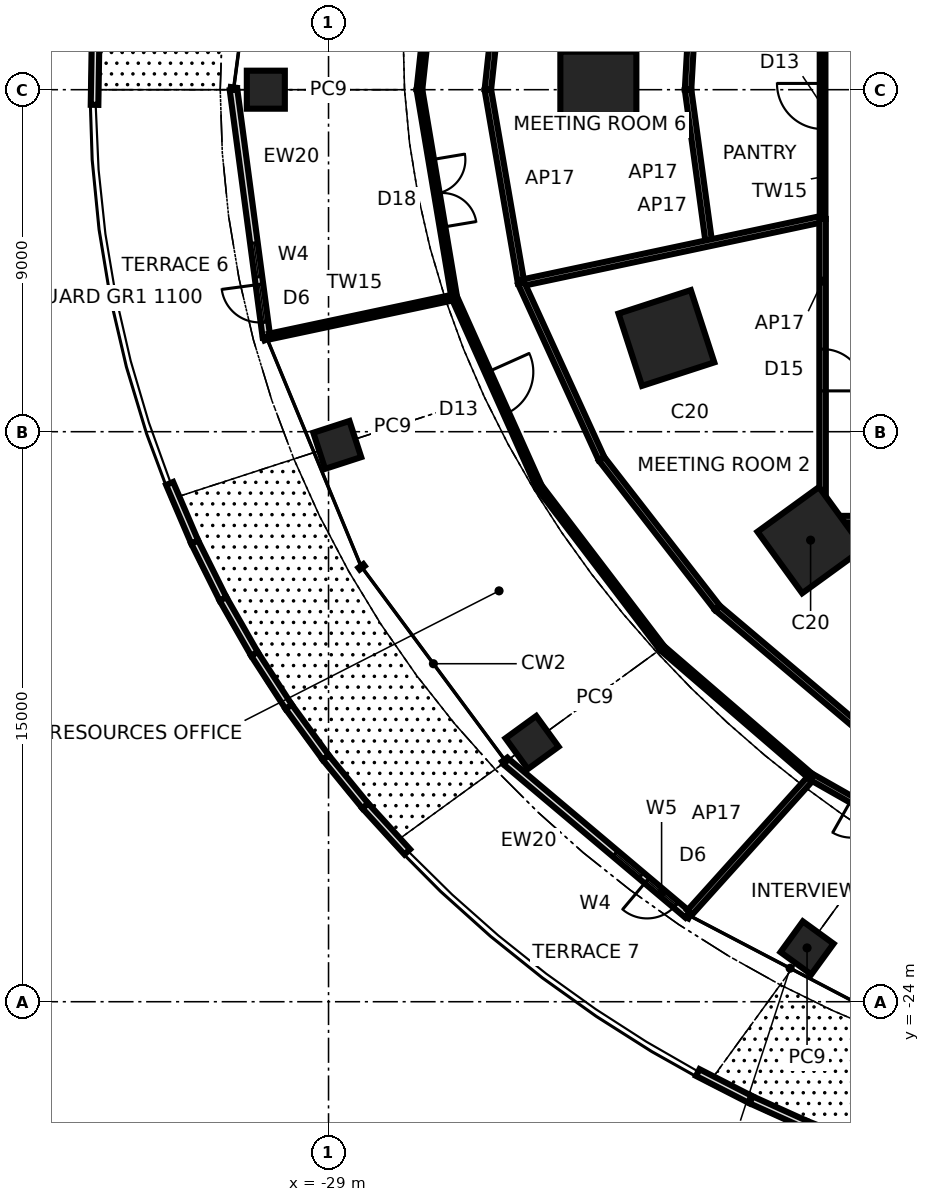
"""IFC4 building model, lengths in metres.
Left out: names, types, materials, properties, quantities, classifications, styles, units other than length and angle.
Written with IfcOpenShell. Run it as: python <this file> out.ifc"""

import sys

from ifc_helpers import new_model, si_unit, direction, frame, frame_2d, origin, origin_2d, place, context, subcontext, project, spatial, rectangle, extrude, element, fill, save


model = new_model("IFC4")
c1 = context("Model", 3, precision=1e-05, world=origin(), true_north=direction((0.0, 1.0)))
c2 = subcontext(c1, "Body", "Model", "MODEL_VIEW")
j1 = project(units=[si_unit("LENGTHUNIT", "METRE"), si_unit("PLANEANGLEUNIT", "RADIAN")], contexts=[c1])
p1 = place(None, origin())
s1 = spatial("IfcSite", under=j1, at=p1, CompositionType="ELEMENT")
p2 = place(p1, origin())
s2 = spatial("IfcBuilding", under=s1, at=p2, CompositionType="ELEMENT")
p3 = place(p2, frame((0.0, 0.0, 15.1)))
s3 = spatial("IfcBuildingStorey", under=s2, at=p3, CompositionType="ELEMENT", Elevation=15.1)
for number, where, z_axis, x_axis in (
    (1, (-21.9, 0.0, 0.0), (0.0, 0.0, 1.0), (-1.0, 0.0, 0.0)),
    (2, (-20.109, -6.534, 0.0), (0.0, 0.0, 1.0), (-0.951, -0.309, 0.0)),
    (3, (-16.315, -11.854, 0.0), (0.0, 0.0, 1.0), (-0.809, -0.588, 0.0)),
):
    element("IfcColumn", number, at=place(p3, frame(where, z_axis=z_axis, x_axis=x_axis)), inside=s3, PredefinedType="COLUMN", context=c2, shape_type="SweptSolid", body=[
        extrude(rectangle(XDim=2.0, YDim=2.0, at=origin_2d()), origin(), (0.0, 0.0, 1.0), 4.5),
    ])
for number, where, z_axis, x_axis in (
    (4, (-30.65, 0.0, 0.0), (0.0, 0.0, 1.0), (-1.0, 0.0, 0.0)),
    (5, (-28.77, -9.348, 0.0), (0.0, 0.0, 1.0), (-0.951, -0.309, 0.0)),
    (6, (-23.645, -17.179, 0.0), (0.0, 0.0, 1.0), (-0.809, -0.588, 0.0)),
    (7, (-16.409, -22.584, 0.0), (0.0, 0.0, 1.0), (-0.588, -0.809, 0.0)),
):
    element("IfcColumn", number, at=place(p3, frame(where, z_axis=z_axis, x_axis=x_axis)), inside=s3, PredefinedType="COLUMN", context=c2, shape_type="SweptSolid", body=[
        extrude(rectangle(XDim=1.0, YDim=1.0, at=origin_2d()), origin(), (0.0, 0.0, 1.0), 4.5),
    ])
p4 = place(p3, frame((-31.5, 0.0, 0.0), z_axis=(0.0, 0.0, 1.0), x_axis=(0.131830186359, -0.991272314737, 0.0)))
e8 = element("IfcWall", 8, at=p4, inside=s3, PredefinedType="SOLIDWALL", context=c2, shape_type="SweptSolid", body=[
    extrude(rectangle(XDim=6.569, YDim=0.2, at=frame_2d((3.284, 0.0))), origin(), (0.0, 0.0, 1.0), 4.3),
])
p5 = place(p4, frame((5.169, 0.0, 0.0)))
e9 = element("IfcOpeningElement", 9, at=p5, cuts=e8, PredefinedType="OPENING", context=c2, shape_type="SweptSolid", body=[
    extrude(rectangle(XDim=1.0, YDim=2.4, at=frame_2d((0.5, 1.2))), frame((0.0, 0.11, 0.0), z_axis=(0.0, -1.0, 0.0), x_axis=(1.0, 0.0, 0.0)), (0.0, 0.0, 1.0), 0.22),
])
p6 = place(p4, frame((4.069, 0.0, 0.3)))
e10 = element("IfcOpeningElement", 10, at=p6, cuts=e8, PredefinedType="OPENING", context=c2, shape_type="SweptSolid", body=[
    extrude(rectangle(XDim=0.9, YDim=2.1, at=frame_2d((0.45, 1.05))), frame((0.0, 0.11, 0.0), z_axis=(0.0, -1.0, 0.0), x_axis=(1.0, 0.0, 0.0)), (0.0, 0.0, 1.0), 0.22),
])
p7 = place(p4, frame((5.169, 0.0, 2.7)))
e11 = element("IfcOpeningElement", 11, at=p7, cuts=e8, PredefinedType="OPENING", context=c2, shape_type="SweptSolid", body=[
    extrude(rectangle(XDim=1.0, YDim=0.6, at=frame_2d((0.5, 0.3))), frame((0.0, 0.11, 0.0), z_axis=(0.0, -1.0, 0.0), x_axis=(1.0, 0.0, 0.0)), (0.0, 0.0, 1.0), 0.22),
])
p8 = place(p3, frame((-24.332, -17.678, 0.0), z_axis=(0.0, 0.0, 1.0), x_axis=(0.764694610458, -0.644392855901, 0.0)))
e12 = element("IfcWall", 12, at=p8, inside=s3, PredefinedType="SOLIDWALL", context=c2, shape_type="SweptSolid", body=[
    extrude(rectangle(XDim=6.257, YDim=0.2, at=frame_2d((3.128, 0.0))), origin(), (0.0, 0.0, 1.0), 4.3),
])
p9 = place(p8, frame((4.857, 0.0, 0.0)))
e13 = element("IfcOpeningElement", 13, at=p9, cuts=e12, PredefinedType="OPENING", context=c2, shape_type="SweptSolid", body=[
    extrude(rectangle(XDim=1.0, YDim=2.4, at=frame_2d((0.5, 1.2))), frame((0.0, 0.11, 0.0), z_axis=(0.0, -1.0, 0.0), x_axis=(1.0, 0.0, 0.0)), (0.0, 0.0, 1.0), 0.22),
])
p10 = place(p8, frame((3.757, 0.0, 0.3)))
e14 = element("IfcOpeningElement", 14, at=p10, cuts=e12, PredefinedType="OPENING", context=c2, shape_type="SweptSolid", body=[
    extrude(rectangle(XDim=0.9, YDim=2.1, at=frame_2d((0.45, 1.05))), frame((0.0, 0.11, 0.0), z_axis=(0.0, -1.0, 0.0), x_axis=(1.0, 0.0, 0.0)), (0.0, 0.0, 1.0), 0.22),
])
p11 = place(p8, frame((4.857, 0.0, 2.7)))
e15 = element("IfcOpeningElement", 15, at=p11, cuts=e12, PredefinedType="OPENING", context=c2, shape_type="SweptSolid", body=[
    extrude(rectangle(XDim=1.0, YDim=0.6, at=frame_2d((0.5, 0.3))), frame((0.0, 0.11, 0.0), z_axis=(0.0, -1.0, 0.0), x_axis=(1.0, 0.0, 0.0)), (0.0, 0.0, 1.0), 0.22),
])
p12 = place(p3, frame((-35.13, 1.293, 0.0), z_axis=(0.0, 0.0, 1.0), x_axis=(-0.016012951677, -0.99987178447, 0.0)))
e16 = element("IfcWall", 16, at=p12, inside=s3, PredefinedType="PARAPET", context=c2, shape_type="SweptSolid", body=[
    extrude(rectangle(XDim=1.692, YDim=0.2, at=frame_2d((0.846, 0.0))), origin(), (0.0, 0.0, 1.0), 1.1),
])
p13 = place(p3, frame((-33.181, -10.362, 0.0), z_axis=(0.0, 0.0, 1.0), x_axis=(0.393462645444, -0.919340604259, 0.0)))
e17 = element("IfcWall", 17, at=p13, inside=s3, PredefinedType="PARAPET", context=c2, shape_type="SweptSolid", body=[
    extrude(rectangle(XDim=1.678, YDim=0.2, at=frame_2d((0.839, 0.0))), origin(), (0.0, 0.0, 1.0), 1.1),
])
p14 = place(p3, frame((-32.521, -11.904, 0.0), z_axis=(0.0, 0.0, 1.0), x_axis=(0.445752950689, -0.895156023804, 0.0)))
e18 = element("IfcWall", 18, at=p14, inside=s3, PredefinedType="PARAPET", context=c2, shape_type="SweptSolid", body=[
    extrude(rectangle(XDim=1.672, YDim=0.2, at=frame_2d((0.836, 0.0))), origin(), (0.0, 0.0, 1.0), 1.1),
])
p15 = place(p3, frame((-31.776, -13.401, 0.0), z_axis=(0.0, 0.0, 1.0), x_axis=(0.495933811562, -0.868360325297, 0.0)))
e19 = element("IfcWall", 19, at=p15, inside=s3, PredefinedType="PARAPET", context=c2, shape_type="SweptSolid", body=[
    extrude(rectangle(XDim=1.667, YDim=0.2, at=frame_2d((0.833, 0.0))), origin(), (0.0, 0.0, 1.0), 1.1),
])
p16 = place(p3, frame((-30.949, -14.848, 0.0), z_axis=(0.0, 0.0, 1.0), x_axis=(0.543995202045, -0.839088326788, 0.0)))
e20 = element("IfcWall", 20, at=p16, inside=s3, PredefinedType="PARAPET", context=c2, shape_type="SweptSolid", body=[
    extrude(rectangle(XDim=1.66, YDim=0.2, at=frame_2d((0.83, 0.0))), origin(), (0.0, 0.0, 1.0), 1.1),
])
p17 = place(p3, frame((-30.047, -16.241, 0.0), z_axis=(0.0, 0.0, 1.0), x_axis=(0.589594151597, -0.8076996573, 0.0)))
e21 = element("IfcWall", 21, at=p17, inside=s3, PredefinedType="PARAPET", context=c2, shape_type="SweptSolid", body=[
    extrude(rectangle(XDim=1.652, YDim=0.2, at=frame_2d((0.826, 0.0))), origin(), (0.0, 0.0, 1.0), 1.1),
])
p18 = place(p3, frame((-29.073, -17.575, 0.0), z_axis=(0.0, 0.0, 1.0), x_axis=(0.632987157267, -0.774162294829, 0.0)))
e22 = element("IfcWall", 22, at=p18, inside=s3, PredefinedType="PARAPET", context=c2, shape_type="SweptSolid", body=[
    extrude(rectangle(XDim=1.645, YDim=0.2, at=frame_2d((0.822, 0.0))), origin(), (0.0, 0.0, 1.0), 1.1),
])
p19 = place(p3, frame((-28.031, -18.848, 0.0), z_axis=(0.0, 0.0, 1.0), x_axis=(0.673823364238, -0.738892464306, 0.0)))
e23 = element("IfcWall", 23, at=p19, inside=s3, PredefinedType="PARAPET", context=c2, shape_type="SweptSolid", body=[
    extrude(rectangle(XDim=1.636, YDim=0.2, at=frame_2d((0.818, 0.0))), origin(), (0.0, 0.0, 1.0), 1.1),
])
p20 = place(p3, frame((-19.285, -25.864, 0.0), z_axis=(0.0, 0.0, 1.0), x_axis=(0.890360687019, -0.45525580393, 0.0)))
e24 = element("IfcWall", 24, at=p20, inside=s3, PredefinedType="PARAPET", context=c2, shape_type="SweptSolid", body=[
    extrude(rectangle(XDim=1.575, YDim=0.2, at=frame_2d((0.788, 0.0))), origin(), (0.0, 0.0, 1.0), 1.1),
])
p21 = place(p3, frame((-17.882, -26.581, 0.0), z_axis=(0.0, 0.0, 1.0), x_axis=(0.911368711004, -0.411590904422, 0.0)))
e25 = element("IfcWall", 25, at=p21, inside=s3, PredefinedType="PARAPET", context=c2, shape_type="SweptSolid", body=[
    extrude(rectangle(XDim=1.564, YDim=0.2, at=frame_2d((0.782, 0.0))), origin(), (0.0, 0.0, 1.0), 1.1),
])
p22 = place(p3, frame((-16.457, -27.225, 0.0), z_axis=(0.0, 0.0, 1.0), x_axis=(0.929825664331, -0.368000317869, 0.0)))
e26 = element("IfcWall", 26, at=p22, inside=s3, PredefinedType="PARAPET", context=c2, shape_type="SweptSolid", body=[
    extrude(rectangle(XDim=1.553, YDim=0.2, at=frame_2d((0.776, 0.0))), origin(), (0.0, 0.0, 1.0), 1.1),
])
p23 = place(p3, frame((-16.0, 2.481, 0.0), z_axis=(0.0, 0.0, 1.0), x_axis=(0.0, -1.0, 0.0)))
e27 = element("IfcWall", 27, at=p23, inside=s3, PredefinedType="PARTITIONING", context=c2, shape_type="SweptSolid", body=[
    extrude(rectangle(XDim=5.882, YDim=0.15, at=frame_2d((2.941, 0.0))), origin(), (0.0, 0.0, 1.0), 4.3),
])
p24 = place(p23, frame((2.316, 0.0, 0.0)))
e28 = element("IfcOpeningElement", 28, at=p24, cuts=e27, PredefinedType="OPENING", context=c2, shape_type="SweptSolid", body=[
    extrude(rectangle(XDim=1.2, YDim=2.4, at=frame_2d((0.6, 1.2))), frame((0.0, 0.085, 0.0), z_axis=(0.0, -1.0, 0.0), x_axis=(1.0, 0.0, 0.0)), (0.0, 0.0, 1.0), 0.17),
])
p25 = place(p3, frame((-23.932, -5.087, 0.0), z_axis=(0.0, 0.0, 1.0), x_axis=(-0.169704177239, 0.985495049317, 0.0)))
e29 = element("IfcWall", 29, at=p25, inside=s3, PredefinedType="PARTITIONING", context=c2, shape_type="SweptSolid", body=[
    extrude(rectangle(XDim=5.162, YDim=0.17, at=frame_2d((2.581, 0.0))), origin(), (0.0, 0.0, 1.0), 4.3),
])
p26 = place(p3, frame((-26.608, 0.0, 0.0), z_axis=(0.0, 0.0, 1.0), x_axis=(0.165292631836, -0.986244566961, 0.0)))
e30 = element("IfcWall", 30, at=p26, inside=s3, PredefinedType="PARTITIONING", context=c2, shape_type="SweptSolid", body=[
    extrude(rectangle(XDim=5.537, YDim=0.15, at=frame_2d((2.769, 0.0))), origin(), (0.0, 0.0, 1.0), 4.3),
])
p27 = place(p26, frame((1.869, 0.0, 0.0)))
e31 = element("IfcOpeningElement", 31, at=p27, cuts=e30, PredefinedType="OPENING", context=c2, shape_type="SweptSolid", body=[
    extrude(rectangle(XDim=1.8, YDim=2.4, at=frame_2d((0.9, 1.2))), frame((0.0, 0.085, 0.0), z_axis=(0.0, -1.0, 0.0), x_axis=(1.0, 0.0, 0.0)), (0.0, 0.0, 1.0), 0.17),
])
p28 = place(p3, frame((-18.99, -4.036, 0.0), z_axis=(0.0, 0.0, 1.0), x_axis=(-0.135024948545, 0.990842198975, 0.0)))
e32 = element("IfcWall", 32, at=p28, inside=s3, PredefinedType="PARTITIONING", context=c2, shape_type="SweptSolid", body=[
    extrude(rectangle(XDim=4.074, YDim=0.17, at=frame_2d((2.037, 0.0))), origin(), (0.0, 0.0, 1.0), 4.3),
])
p29 = place(p3, frame((-23.932, -5.087, 0.0), z_axis=(0.0, 0.0, 1.0), x_axis=(0.97814737229, 0.20791276556, 0.0)))
e33 = element("IfcWall", 33, at=p29, inside=s3, PredefinedType="PARTITIONING", context=c2, shape_type="SweptSolid", body=[
    extrude(rectangle(XDim=8.109, YDim=0.17, at=frame_2d((4.055, 0.0))), origin(), (0.0, 0.0, 1.0), 4.3),
])
p30 = place(p3, frame((-25.693, -5.461, 0.0), z_axis=(0.0, 0.0, 1.0), x_axis=(-0.978146743391, -0.207915724259, 0.0)))
e34 = element("IfcWall", 34, at=p30, inside=s3, PredefinedType="PARTITIONING", context=c2, shape_type="SweptSolid", body=[
    extrude(rectangle(XDim=4.972, YDim=0.15, at=frame_2d((2.486, 0.0))), origin(), (0.0, 0.0, 1.0), 4.3),
])
p31 = place(p3, frame((-21.816, -9.713, 0.0), z_axis=(0.0, 0.0, 1.0), x_axis=(-0.415942352912, 0.909390982501, 0.0)))
e35 = element("IfcWall", 35, at=p31, inside=s3, PredefinedType="PARTITIONING", context=c2, shape_type="SweptSolid", body=[
    extrude(rectangle(XDim=5.087, YDim=0.17, at=frame_2d((2.543, 0.0))), origin(), (0.0, 0.0, 1.0), 4.3),
])
p32 = place(p3, frame((-25.693, -5.461, 0.0), z_axis=(0.0, 0.0, 1.0), x_axis=(0.408737544403, -0.912651970795, 0.0)))
e36 = element("IfcWall", 36, at=p32, inside=s3, PredefinedType="PARTITIONING", context=c2, shape_type="SweptSolid", body=[
    extrude(rectangle(XDim=5.461, YDim=0.15, at=frame_2d((2.73, 0.0))), origin(), (0.0, 0.0, 1.0), 4.3),
])
p33 = place(p32, frame((2.156, 0.0, 0.0)))
e37 = element("IfcOpeningElement", 37, at=p33, cuts=e36, PredefinedType="OPENING", context=c2, shape_type="SweptSolid", body=[
    extrude(rectangle(XDim=1.2, YDim=2.4, at=frame_2d((0.6, 1.2))), frame((0.0, 0.085, 0.0), z_axis=(0.0, -1.0, 0.0), x_axis=(1.0, 0.0, 0.0)), (0.0, 0.0, 1.0), 0.17),
])
p34 = place(p3, frame((-16.0, -3.401, 0.0), z_axis=(0.0, 0.0, 1.0), x_axis=(0.0, -1.0, 0.0)))
e38 = element("IfcWall", 38, at=p34, inside=s3, PredefinedType="PARTITIONING", context=c2, shape_type="SweptSolid", body=[
    extrude(rectangle(XDim=7.899, YDim=0.17, at=frame_2d((3.95, 0.0))), origin(), (0.0, 0.0, 1.0), 4.3),
])
p35 = place(p34, frame((3.425, 0.0, 0.0)))
e39 = element("IfcOpeningElement", 39, at=p35, cuts=e38, PredefinedType="OPENING", context=c2, shape_type="SweptSolid", body=[
    extrude(rectangle(XDim=1.1, YDim=2.4, at=frame_2d((0.55, 1.2))), frame((0.0, 0.095, 0.0), z_axis=(0.0, -1.0, 0.0), x_axis=(1.0, 0.0, 0.0)), (0.0, 0.0, 1.0), 0.19),
])
p36 = place(p3, frame((-18.768, -13.636, 0.0), z_axis=(0.0, 0.0, 1.0), x_axis=(-0.613532245813, 0.789669667233, 0.0)))
e40 = element("IfcWall", 40, at=p36, inside=s3, PredefinedType="PARTITIONING", context=c2, shape_type="SweptSolid", body=[
    extrude(rectangle(XDim=4.968, YDim=0.17, at=frame_2d((2.484, 0.0))), origin(), (0.0, 0.0, 1.0), 4.3),
])
p37 = place(p3, frame((-23.46, -10.445, 0.0), z_axis=(0.0, 0.0, 1.0), x_axis=(0.605937156355, -0.795512515646, 0.0)))
e41 = element("IfcWall", 41, at=p37, inside=s3, PredefinedType="PARTITIONING", context=c2, shape_type="SweptSolid", body=[
    extrude(rectangle(XDim=5.341, YDim=0.15, at=frame_2d((2.67, 0.0))), origin(), (0.0, 0.0, 1.0), 4.3),
])
p38 = place(p3, frame((-15.082, -16.75, 0.0), z_axis=(0.0, 0.0, 1.0), x_axis=(-0.763840902497, 0.645404582935, 0.0)))
e42 = element("IfcWall", 42, at=p38, inside=s3, PredefinedType="PARTITIONING", context=c2, shape_type="SweptSolid", body=[
    extrude(rectangle(XDim=4.826, YDim=0.17, at=frame_2d((2.413, 0.0))), origin(), (0.0, 0.0, 1.0), 4.3),
])
p39 = place(p3, frame((-20.224, -14.694, 0.0), z_axis=(0.0, 0.0, 1.0), x_axis=(0.757397147913, -0.652954485652, 0.0)))
e43 = element("IfcWall", 43, at=p39, inside=s3, PredefinedType="PARTITIONING", context=c2, shape_type="SweptSolid", body=[
    extrude(rectangle(XDim=5.199, YDim=0.15, at=frame_2d((2.599, 0.0))), origin(), (0.0, 0.0, 1.0), 4.3),
])
p40 = place(p3, frame((-16.287, -18.088, 0.0), z_axis=(0.0, 0.0, 1.0), x_axis=(-0.669136360949, -0.74313964398, 0.0)))
e44 = element("IfcWall", 44, at=p40, inside=s3, PredefinedType="PARTITIONING", context=c2, shape_type="SweptSolid", body=[
    extrude(rectangle(XDim=4.793, YDim=0.17, at=frame_2d((2.397, 0.0))), origin(), (0.0, 0.0, 1.0), 4.3),
])
p41 = place(p3, frame((-16.287, -18.088, 0.0), z_axis=(0.0, 0.0, 1.0), x_axis=(0.869623219344, -0.493715967312, 0.0)))
e45 = element("IfcWall", 45, at=p41, inside=s3, PredefinedType="PARTITIONING", context=c2, shape_type="SweptSolid", body=[
    extrude(rectangle(XDim=5.061, YDim=0.17, at=frame_2d((2.53, 0.0))), origin(), (0.0, 0.0, 1.0), 4.3),
])
p42 = place(p41, frame((1.203, 0.0, 0.0)))
e46 = element("IfcOpeningElement", 46, at=p42, cuts=e45, PredefinedType="OPENING", context=c2, shape_type="SweptSolid", body=[
    extrude(rectangle(XDim=1.0, YDim=2.4, at=frame_2d((0.5, 1.2))), frame((0.0, 0.095, 0.0), z_axis=(0.0, -1.0, 0.0), x_axis=(1.0, 0.0, 0.0)), (0.0, 0.0, 1.0), 0.19),
])
p43 = place(p3, frame((-16.0, -11.3, 0.0), z_axis=(0.0, 0.0, 1.0), x_axis=(1.0, 0.0, 0.0)))
e47 = element("IfcWall", 47, at=p43, inside=s3, PredefinedType="PARTITIONING", context=c2, shape_type="SweptSolid", body=[
    extrude(rectangle(XDim=22.524, YDim=0.17, at=frame_2d((11.262, 0.0))), origin(), (0.0, 0.0, 1.0), 4.3),
])
p44 = place(p43, frame((18.118, 0.0, 0.0)))
e48 = element("IfcOpeningElement", 48, at=p44, cuts=e47, PredefinedType="OPENING", context=c2, shape_type="SweptSolid", body=[
    extrude(rectangle(XDim=1.1, YDim=2.4, at=frame_2d((0.55, 1.2))), frame((0.0, 0.095, 0.0), z_axis=(0.0, -1.0, 0.0), x_axis=(1.0, 0.0, 0.0)), (0.0, 0.0, 1.0), 0.19),
])
p45 = place(p43, frame((9.794, 0.0, 0.0)))
e49 = element("IfcOpeningElement", 49, at=p45, cuts=e47, PredefinedType="OPENING", context=c2, shape_type="SweptSolid", body=[
    extrude(rectangle(XDim=1.0, YDim=2.4, at=frame_2d((0.5, 1.2))), frame((0.0, 0.095, 0.0), z_axis=(0.0, -1.0, 0.0), x_axis=(1.0, 0.0, 0.0)), (0.0, 0.0, 1.0), 0.19),
])
p46 = place(p3, frame((-26.009, 5.528, 0.0), z_axis=(0.0, 0.0, 1.0), x_axis=(-0.107698829118, -0.994183565649, 0.0)))
e50 = element("IfcWall", 50, at=p46, inside=s3, PredefinedType="PARTITIONING", context=c2, shape_type="SweptSolid", body=[
    extrude(rectangle(XDim=5.561, YDim=0.15, at=frame_2d((2.78, 0.0))), origin(), (0.0, 0.0, 1.0), 4.3),
])
p47 = place(p3, frame((-24.808, 0.0, 0.0), z_axis=(0.0, 0.0, 1.0), x_axis=(0.107983193609, 0.994152719605, 0.0)))
e51 = element("IfcWall", 51, at=p47, inside=s3, PredefinedType="PARTITIONING", context=c2, shape_type="SweptSolid", body=[
    extrude(rectangle(XDim=4.28, YDim=0.17, at=frame_2d((2.14, 0.0))), origin(), (0.0, 0.0, 1.0), 4.3),
])
p48 = place(p3, frame((-19.54, 0.0, 0.0), z_axis=(0.0, 0.0, 1.0), x_axis=(0.056843363857, 0.998383108824, 0.0)))
e52 = element("IfcWall", 52, at=p48, inside=s3, PredefinedType="PARTITIONING", context=c2, shape_type="SweptSolid", body=[
    extrude(rectangle(XDim=3.2, YDim=0.17, at=frame_2d((1.6, 0.0))), origin(), (0.0, 0.0, 1.0), 4.3),
])
p49 = place(p5, frame((1.0, 0.0, 0.0), z_axis=(0.0, 0.0, 1.0), x_axis=(-1.0, 0.0, 0.0)))
e53 = element("IfcDoor", 53, at=p49, inside=s3, OperationType="SINGLE_SWING_RIGHT", PredefinedType="DOOR", context=c2, shape_type="SweptSolid", body=[
    extrude(rectangle(XDim=1.0, YDim=2.4, at=frame_2d((0.5, 1.2))), frame((0.0, 0.025, 0.0), z_axis=(0.0, -1.0, 0.0), x_axis=(1.0, 0.0, 0.0)), (0.0, 0.0, 1.0), 0.05),
])
fill(e9, e53)
p50 = place(p6, origin())
e54 = element("IfcWindow", 54, at=p50, inside=s3, PartitioningType="SINGLE_PANEL", PredefinedType="WINDOW", context=c2, shape_type="SweptSolid", body=[
    extrude(rectangle(XDim=0.9, YDim=2.1, at=frame_2d((0.45, 1.05))), frame((0.0, 0.03, 0.0), z_axis=(0.0, -1.0, 0.0), x_axis=(1.0, 0.0, 0.0)), (0.0, 0.0, 1.0), 0.06),
])
fill(e10, e54)
p51 = place(p7, origin())
e55 = element("IfcWindow", 55, at=p51, inside=s3, PartitioningType="SINGLE_PANEL", PredefinedType="WINDOW", context=c2, shape_type="SweptSolid", body=[
    extrude(rectangle(XDim=1.0, YDim=0.6, at=frame_2d((0.5, 0.3))), frame((0.0, 0.03, 0.0), z_axis=(0.0, -1.0, 0.0), x_axis=(1.0, 0.0, 0.0)), (0.0, 0.0, 1.0), 0.06),
])
fill(e11, e55)
p52 = place(p9, frame((1.0, 0.0, 0.0), z_axis=(0.0, 0.0, 1.0), x_axis=(-1.0, 0.0, 0.0)))
e56 = element("IfcDoor", 56, at=p52, inside=s3, OperationType="SINGLE_SWING_RIGHT", PredefinedType="DOOR", context=c2, shape_type="SweptSolid", body=[
    extrude(rectangle(XDim=1.0, YDim=2.4, at=frame_2d((0.5, 1.2))), frame((0.0, 0.025, 0.0), z_axis=(0.0, -1.0, 0.0), x_axis=(1.0, 0.0, 0.0)), (0.0, 0.0, 1.0), 0.05),
])
fill(e13, e56)
p53 = place(p10, origin())
e57 = element("IfcWindow", 57, at=p53, inside=s3, PartitioningType="SINGLE_PANEL", PredefinedType="WINDOW", context=c2, shape_type="SweptSolid", body=[
    extrude(rectangle(XDim=0.9, YDim=2.1, at=frame_2d((0.45, 1.05))), frame((0.0, 0.03, 0.0), z_axis=(0.0, -1.0, 0.0), x_axis=(1.0, 0.0, 0.0)), (0.0, 0.0, 1.0), 0.06),
])
fill(e14, e57)
p54 = place(p11, origin())
e58 = element("IfcWindow", 58, at=p54, inside=s3, PartitioningType="SINGLE_PANEL", PredefinedType="WINDOW", context=c2, shape_type="SweptSolid", body=[
    extrude(rectangle(XDim=1.0, YDim=0.6, at=frame_2d((0.5, 0.3))), frame((0.0, 0.03, 0.0), z_axis=(0.0, -1.0, 0.0), x_axis=(1.0, 0.0, 0.0)), (0.0, 0.0, 1.0), 0.06),
])
fill(e15, e58)
p55 = place(p35, origin())
e59 = element("IfcDoor", 59, at=p55, inside=s3, OperationType="SINGLE_SWING_RIGHT", PredefinedType="DOOR", context=c2, shape_type="SweptSolid", body=[
    extrude(rectangle(XDim=1.1, YDim=2.4, at=frame_2d((0.55, 1.2))), frame((0.0, 0.025, 0.0), z_axis=(0.0, -1.0, 0.0), x_axis=(1.0, 0.0, 0.0)), (0.0, 0.0, 1.0), 0.05),
])
fill(e39, e59)
p56 = place(p24, frame((1.2, 0.0, 0.0), z_axis=(0.0, 0.0, 1.0), x_axis=(-1.0, 0.0, 0.0)))
e60 = element("IfcDoor", 60, at=p56, inside=s3, OperationType="SINGLE_SWING_RIGHT", PredefinedType="DOOR", context=c2, shape_type="SweptSolid", body=[
    extrude(rectangle(XDim=1.2, YDim=2.4, at=frame_2d((0.6, 1.2))), frame((0.0, 0.025, 0.0), z_axis=(0.0, -1.0, 0.0), x_axis=(1.0, 0.0, 0.0)), (0.0, 0.0, 1.0), 0.05),
])
fill(e28, e60)
p57 = place(p27, origin())
e61 = element("IfcDoor", 61, at=p57, inside=s3, OperationType="DOUBLE_DOOR_SINGLE_SWING", PredefinedType="DOOR", context=c2, shape_type="SweptSolid", body=[
    extrude(rectangle(XDim=1.8, YDim=2.4, at=frame_2d((0.9, 1.2))), frame((0.0, 0.025, 0.0), z_axis=(0.0, -1.0, 0.0), x_axis=(1.0, 0.0, 0.0)), (0.0, 0.0, 1.0), 0.05),
])
fill(e31, e61)
p58 = place(p33, origin())
e62 = element("IfcDoor", 62, at=p58, inside=s3, OperationType="SINGLE_SWING_LEFT", PredefinedType="DOOR", context=c2, shape_type="SweptSolid", body=[
    extrude(rectangle(XDim=1.2, YDim=2.4, at=frame_2d((0.6, 1.2))), frame((0.0, 0.025, 0.0), z_axis=(0.0, -1.0, 0.0), x_axis=(1.0, 0.0, 0.0)), (0.0, 0.0, 1.0), 0.05),
])
fill(e37, e62)
save(model, sys.argv[1])
